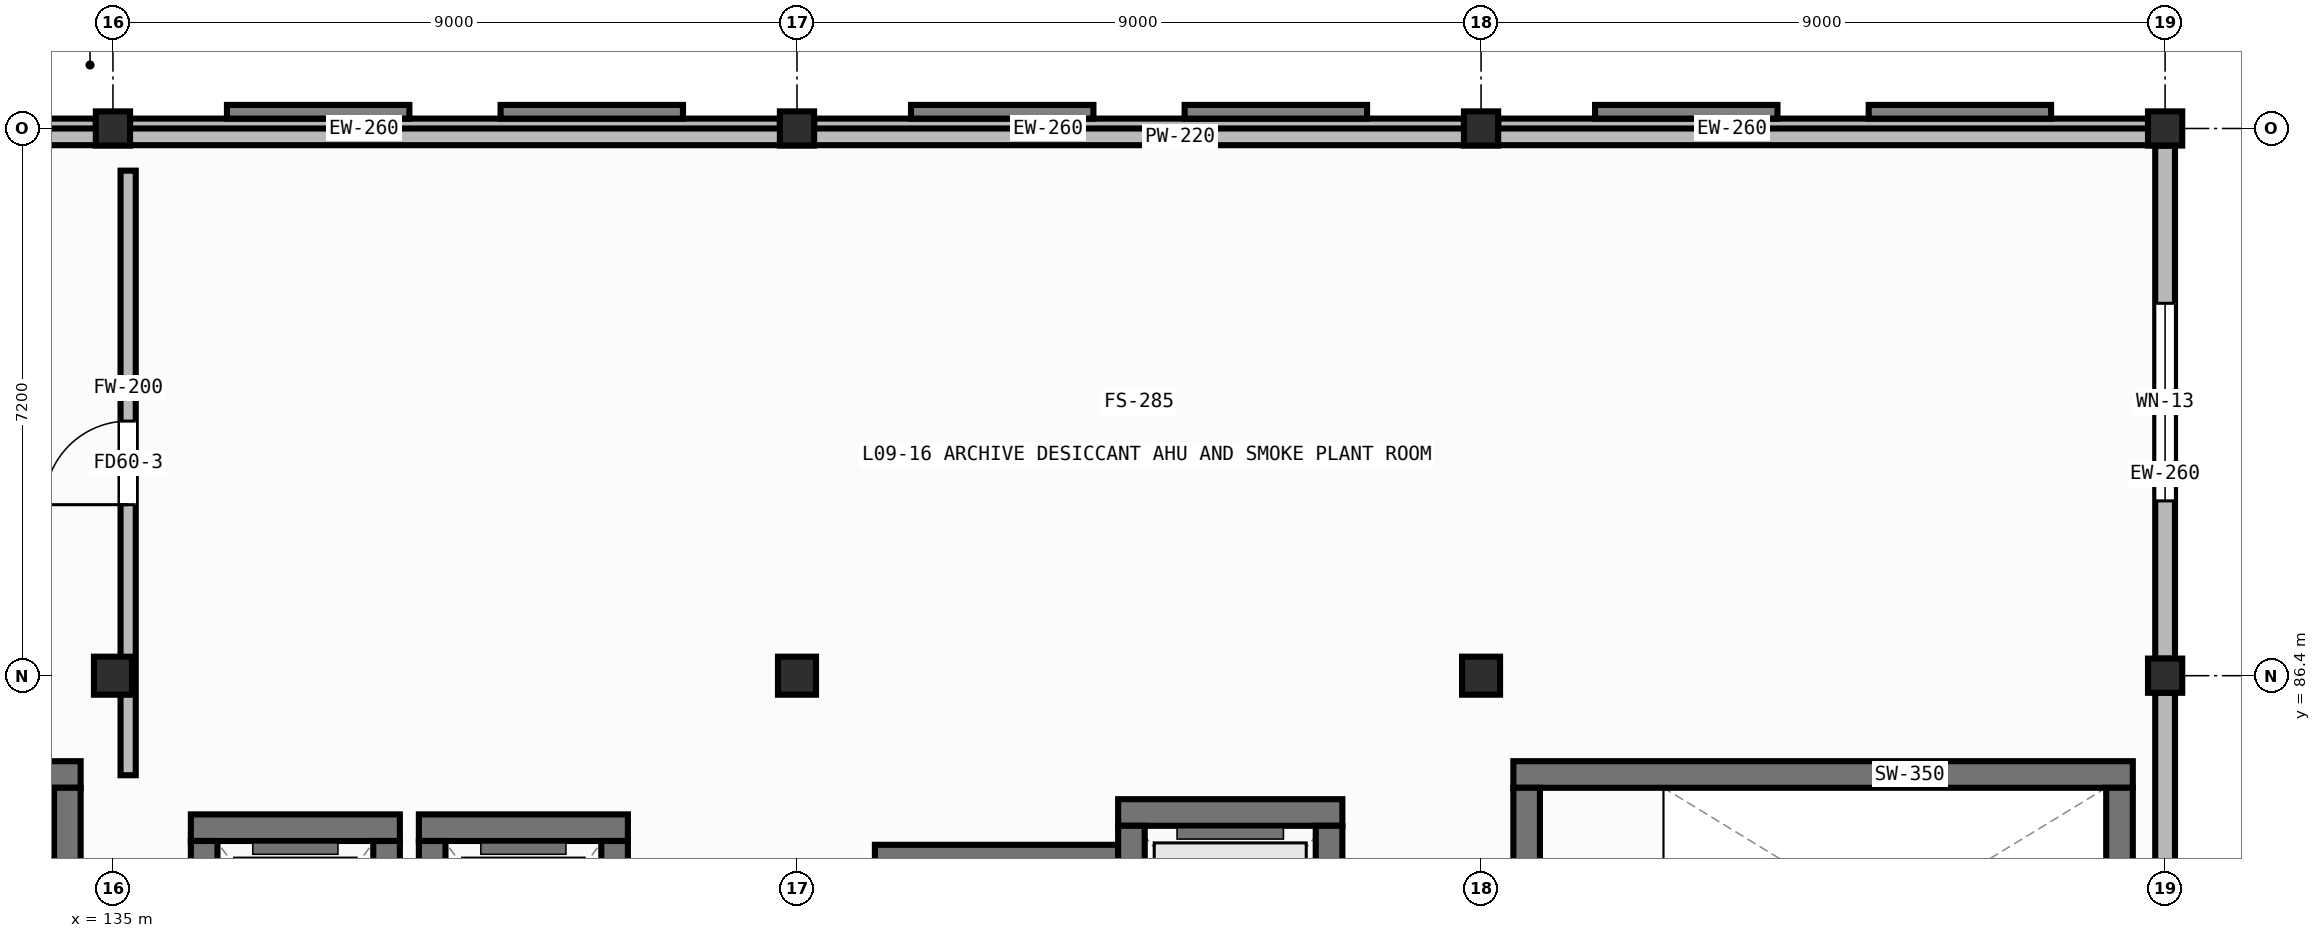
"""IFC4 building model, lengths in metres.
Left out: names, types, materials, properties, quantities, classifications, styles, units other than length and angle.
Written with IfcOpenShell. Run it as: python <this file> out.ifc"""

import sys

from ifc_helpers import new_model, si_unit, direction, frame, frame_2d, origin, origin_2d, place, context, subcontext, project, spatial, rectangle, hollow_rectangle, extrude, element, fill, save


model = new_model("IFC4")
c1 = context("Model", 3, precision=1e-05, world=origin(), true_north=direction((0.0, 1.0)))
c2 = subcontext(c1, "Body", "Model", "MODEL_VIEW")
j1 = project(units=[si_unit("LENGTHUNIT", "METRE"), si_unit("PLANEANGLEUNIT", "RADIAN")], contexts=[c1])
p1 = place(None, origin())
s1 = spatial("IfcSite", under=j1, at=p1, CompositionType="ELEMENT")
p2 = place(p1, origin())
s2 = spatial("IfcBuilding", under=s1, at=p2, CompositionType="ELEMENT")
p3 = place(p2, frame((0.0, 0.0, 31.4)))
s3 = spatial("IfcBuildingStorey", under=s2, at=p3, CompositionType="ELEMENT", Elevation=31.4)
p4 = place(p3, frame((135.0, 86.4, 0.0), z_axis=(0.0, 0.0, 1.0), x_axis=(1.0, 0.0, 0.0)))
e1 = element("IfcColumn", 1, at=p4, inside=s3, PredefinedType="COLUMN", context=c2, shape_type="SweptSolid", body=[
    extrude(hollow_rectangle(XDim=0.5, YDim=0.5, WallThickness=0.022, at=origin_2d()), origin(), (0.0, 0.0, 1.0), 3.56),
])
p5 = place(p3, frame((135.0, 93.6, 0.0), z_axis=(0.0, 0.0, 1.0), x_axis=(1.0, 0.0, 0.0)))
e2 = element("IfcColumn", 2, at=p5, inside=s3, PredefinedType="COLUMN", context=c2, shape_type="SweptSolid", body=[
    extrude(hollow_rectangle(XDim=0.45, YDim=0.45, WallThickness=0.019, at=origin_2d()), origin(), (0.0, 0.0, 1.0), 3.56),
])
p6 = place(p3, frame((144.0, 86.4, 0.0), z_axis=(0.0, 0.0, 1.0), x_axis=(1.0, 0.0, 0.0)))
e3 = element("IfcColumn", 3, at=p6, inside=s3, PredefinedType="COLUMN", context=c2, shape_type="SweptSolid", body=[
    extrude(hollow_rectangle(XDim=0.5, YDim=0.5, WallThickness=0.022, at=origin_2d()), origin(), (0.0, 0.0, 1.0), 3.56),
])
p7 = place(p3, frame((144.0, 93.6, 0.0), z_axis=(0.0, 0.0, 1.0), x_axis=(1.0, 0.0, 0.0)))
e4 = element("IfcColumn", 4, at=p7, inside=s3, PredefinedType="COLUMN", context=c2, shape_type="SweptSolid", body=[
    extrude(hollow_rectangle(XDim=0.45, YDim=0.45, WallThickness=0.019, at=origin_2d()), origin(), (0.0, 0.0, 1.0), 3.56),
])
p8 = place(p3, frame((153.0, 86.4, 0.0), z_axis=(0.0, 0.0, 1.0), x_axis=(1.0, 0.0, 0.0)))
e5 = element("IfcColumn", 5, at=p8, inside=s3, PredefinedType="COLUMN", context=c2, shape_type="SweptSolid", body=[
    extrude(hollow_rectangle(XDim=0.5, YDim=0.5, WallThickness=0.022, at=origin_2d()), origin(), (0.0, 0.0, 1.0), 3.56),
])
for number, where, z_axis, x_axis in (
    (6, (153.0, 93.6, 0.0), (0.0, 0.0, 1.0), (1.0, 0.0, 0.0)),
    (7, (162.0, 86.4, 0.0), (0.0, 0.0, 1.0), (1.0, 0.0, 0.0)),
    (8, (162.0, 93.6, 0.0), (0.0, 0.0, 1.0), (1.0, 0.0, 0.0)),
):
    element("IfcColumn", number, at=place(p3, frame(where, z_axis=z_axis, x_axis=x_axis)), inside=s3, PredefinedType="COLUMN", context=c2, shape_type="SweptSolid", body=[
        extrude(hollow_rectangle(XDim=0.45, YDim=0.45, WallThickness=0.019, at=origin_2d()), origin(), (0.0, 0.0, 1.0), 3.56),
    ])
for number, where, z_axis, x_axis in (
    (9, (134.775, 93.6, 0.0), (0.0, 0.0, 1.0), (-1.0, 0.0, 0.0)),
    (10, (143.775, 93.6, 0.0), (0.0, 0.0, 1.0), (-1.0, 0.0, 0.0)),
    (11, (152.775, 93.6, 0.0), (0.0, 0.0, 1.0), (-1.0, 0.0, 0.0)),
    (12, (161.775, 93.6, 0.0), (0.0, 0.0, 1.0), (-1.0, 0.0, 0.0)),
):
    element("IfcWall", number, at=place(p3, frame(where, z_axis=z_axis, x_axis=x_axis)), inside=s3, PredefinedType="STANDARD", context=c2, shape_type="SweptSolid", body=[
        extrude(rectangle(XDim=8.55, YDim=0.26, at=frame_2d((4.275, 0.0))), origin(), (0.0, 0.0, 1.0), 3.16),
    ])
p9 = place(p3, frame((162.0, 86.175, 0.0), z_axis=(0.0, 0.0, 1.0), x_axis=(0.0, -1.0, 0.0)))
e13 = element("IfcWall", 13, at=p9, inside=s3, PredefinedType="STANDARD", context=c2, shape_type="SweptSolid", body=[
    extrude(rectangle(XDim=6.75, YDim=0.26, at=frame_2d((3.375, 0.0))), origin(), (0.0, 0.0, 1.0), 3.16),
])
p10 = place(p3, frame((162.0, 93.375, 0.0), z_axis=(0.0, 0.0, 1.0), x_axis=(0.0, -1.0, 0.0)))
e14 = element("IfcWall", 14, at=p10, inside=s3, PredefinedType="STANDARD", context=c2, shape_type="SweptSolid", body=[
    extrude(rectangle(XDim=6.75, YDim=0.26, at=frame_2d((3.375, 0.0))), origin(), (0.0, 0.0, 1.0), 3.16),
])
p11 = place(p10, frame((2.075, 0.0, 0.85)))
e15 = element("IfcOpeningElement", 15, at=p11, cuts=e14, PredefinedType="OPENING", context=c2, shape_type="SweptSolid", body=[
    extrude(rectangle(XDim=2.6, YDim=1.6, at=frame_2d((1.3, 0.8))), frame((0.0, 0.142, 0.0), z_axis=(0.0, -1.0, 0.0), x_axis=(1.0, 0.0, 0.0)), (0.0, 0.0, 1.0), 0.284),
])
p12 = place(p3, frame((126.0, 93.49, 3.8), z_axis=(0.0, 0.0, 1.0), x_axis=(1.0, 0.0, 0.0)))
e16 = element("IfcWall", 16, at=p12, inside=s3, PredefinedType="PARAPET", context=c2, shape_type="SweptSolid", body=[
    extrude(rectangle(XDim=36.0, YDim=0.22, at=frame_2d((18.0, 0.0))), origin(), (0.0, 0.0, 1.0), 0.9),
])
p13 = place(p3, frame((126.425, 85.1, 0.0), z_axis=(0.0, 0.0, 1.0), x_axis=(1.0, 0.0, 0.0)))
e17 = element("IfcWall", 17, at=p13, inside=s3, PredefinedType="SHEAR", context=c2, shape_type="SweptSolid", body=[
    extrude(rectangle(XDim=8.15, YDim=0.35, at=frame_2d((4.075, 0.0))), origin(), (0.0, 0.0, 1.0), 3.56),
])
p14 = place(p3, frame((134.4, 81.375, 0.0), z_axis=(0.0, 0.0, 1.0), x_axis=(0.0, 1.0, 0.0)))
e18 = element("IfcWall", 18, at=p14, inside=s3, PredefinedType="SHEAR", context=c2, shape_type="SweptSolid", body=[
    extrude(rectangle(XDim=3.55, YDim=0.35, at=frame_2d((1.775, 0.0))), origin(), (0.0, 0.0, 1.0), 3.56),
])
p15 = place(p3, frame((153.425, 85.1, 0.0), z_axis=(0.0, 0.0, 1.0), x_axis=(1.0, 0.0, 0.0)))
e19 = element("IfcWall", 19, at=p15, inside=s3, PredefinedType="SHEAR", context=c2, shape_type="SweptSolid", body=[
    extrude(rectangle(XDim=8.15, YDim=0.35, at=frame_2d((4.075, 0.0))), origin(), (0.0, 0.0, 1.0), 3.56),
])
for number, where, z_axis, x_axis in (
    (20, (153.6, 81.375, 0.0), (0.0, 0.0, 1.0), (0.0, 1.0, 0.0)),
    (21, (161.4, 81.375, 0.0), (0.0, 0.0, 1.0), (0.0, 1.0, 0.0)),
):
    element("IfcWall", number, at=place(p3, frame(where, z_axis=z_axis, x_axis=x_axis)), inside=s3, PredefinedType="SHEAR", context=c2, shape_type="SweptSolid", body=[
        extrude(rectangle(XDim=3.55, YDim=0.35, at=frame_2d((1.775, 0.0))), origin(), (0.0, 0.0, 1.0), 3.56),
    ])
p16 = place(p3, frame((136.025, 84.4, 0.0), z_axis=(0.0, 0.0, 1.0), x_axis=(1.0, 0.0, 0.0)))
e22 = element("IfcWall", 22, at=p16, inside=s3, PredefinedType="SHEAR", context=c2, shape_type="SweptSolid", body=[
    extrude(rectangle(XDim=2.75, YDim=0.35, at=frame_2d((1.375, 0.0))), origin(), (0.0, 0.0, 1.0), 4.25),
])
for number, where, z_axis, x_axis in (
    (23, (136.2, 81.375, 0.0), (0.0, 0.0, 1.0), (0.0, 1.0, 0.0)),
    (24, (138.6, 81.375, 0.0), (0.0, 0.0, 1.0), (0.0, 1.0, 0.0)),
):
    element("IfcWall", number, at=place(p3, frame(where, z_axis=z_axis, x_axis=x_axis)), inside=s3, PredefinedType="SHEAR", context=c2, shape_type="SweptSolid", body=[
        extrude(rectangle(XDim=2.85, YDim=0.35, at=frame_2d((1.425, 0.0))), origin(), (0.0, 0.0, 1.0), 4.25),
    ])
p17 = place(p3, frame((139.025, 84.4, 0.0), z_axis=(0.0, 0.0, 1.0), x_axis=(1.0, 0.0, 0.0)))
e25 = element("IfcWall", 25, at=p17, inside=s3, PredefinedType="SHEAR", context=c2, shape_type="SweptSolid", body=[
    extrude(rectangle(XDim=2.75, YDim=0.35, at=frame_2d((1.375, 0.0))), origin(), (0.0, 0.0, 1.0), 4.25),
])
for number, where, z_axis, x_axis in (
    (26, (139.2, 81.375, 0.0), (0.0, 0.0, 1.0), (0.0, 1.0, 0.0)),
    (27, (141.6, 81.375, 0.0), (0.0, 0.0, 1.0), (0.0, 1.0, 0.0)),
):
    element("IfcWall", number, at=place(p3, frame(where, z_axis=z_axis, x_axis=x_axis)), inside=s3, PredefinedType="SHEAR", context=c2, shape_type="SweptSolid", body=[
        extrude(rectangle(XDim=2.85, YDim=0.35, at=frame_2d((1.425, 0.0))), origin(), (0.0, 0.0, 1.0), 4.25),
    ])
p18 = place(p3, frame((145.025, 84.0, 0.0), z_axis=(0.0, 0.0, 1.0), x_axis=(1.0, 0.0, 0.0)))
e28 = element("IfcWall", 28, at=p18, inside=s3, PredefinedType="SHEAR", context=c2, shape_type="SweptSolid", body=[
    extrude(rectangle(XDim=3.2, YDim=0.35, at=frame_2d((1.6, 0.0))), origin(), (0.0, 0.0, 1.0), 4.25),
])
p19 = place(p3, frame((148.225, 84.6, 0.0), z_axis=(0.0, 0.0, 1.0), x_axis=(1.0, 0.0, 0.0)))
e29 = element("IfcWall", 29, at=p19, inside=s3, PredefinedType="SHEAR", context=c2, shape_type="SweptSolid", body=[
    extrude(rectangle(XDim=2.95, YDim=0.35, at=frame_2d((1.475, 0.0))), origin(), (0.0, 0.0, 1.0), 4.25),
])
for number, where, z_axis, x_axis in (
    (30, (148.4, 81.375, 0.0), (0.0, 0.0, 1.0), (0.0, 1.0, 0.0)),
    (31, (151.0, 81.375, 0.0), (0.0, 0.0, 1.0), (0.0, 1.0, 0.0)),
):
    element("IfcWall", number, at=place(p3, frame(where, z_axis=z_axis, x_axis=x_axis)), inside=s3, PredefinedType="SHEAR", context=c2, shape_type="SweptSolid", body=[
        extrude(rectangle(XDim=3.05, YDim=0.35, at=frame_2d((1.525, 0.0))), origin(), (0.0, 0.0, 1.0), 4.25),
    ])
p20 = place(p3, frame((135.2, 85.09, 0.0), z_axis=(0.0, 0.0, 1.0), x_axis=(0.0, 1.0, 0.0)))
e32 = element("IfcWall", 32, at=p20, inside=s3, PredefinedType="PARTITIONING", context=c2, shape_type="SweptSolid", body=[
    extrude(rectangle(XDim=7.955, YDim=0.2, at=frame_2d((3.978, 0.0))), origin(), (0.0, 0.0, 1.0), 2.84),
])
p21 = place(p20, frame((3.56, 0.0, 0.0)))
e33 = element("IfcOpeningElement", 33, at=p21, cuts=e32, PredefinedType="OPENING", context=c2, shape_type="SweptSolid", body=[
    extrude(rectangle(XDim=1.1, YDim=2.08, at=frame_2d((0.55, 1.04))), frame((0.0, 0.112, 0.0), z_axis=(0.0, -1.0, 0.0), x_axis=(1.0, 0.0, 0.0)), (0.0, 0.0, 1.0), 0.224),
])
p22 = place(p11, origin())
e34 = element("IfcWindow", 34, at=p22, inside=s3, PartitioningType="DOUBLE_PANEL_VERTICAL", PredefinedType="WINDOW", context=c2, shape_type="SweptSolid", body=[
    extrude(rectangle(XDim=2.6, YDim=1.6, at=frame_2d((1.3, 0.8))), frame((0.0, 0.03, 0.0), z_axis=(0.0, -1.0, 0.0), x_axis=(1.0, 0.0, 0.0)), (0.0, 0.0, 1.0), 0.06),
])
fill(e15, e34)
p23 = place(p21, origin())
e35 = element("IfcDoor", 35, at=p23, inside=s3, OperationType="SINGLE_SWING_LEFT", PredefinedType="DOOR", context=c2, shape_type="SweptSolid", body=[
    extrude(rectangle(XDim=1.1, YDim=2.08, at=frame_2d((0.55, 1.04))), frame((0.0, 0.025, 0.0), z_axis=(0.0, -1.0, 0.0), x_axis=(1.0, 0.0, 0.0)), (0.0, 0.0, 1.0), 0.05),
])
fill(e33, e35)
save(model, sys.argv[1])
